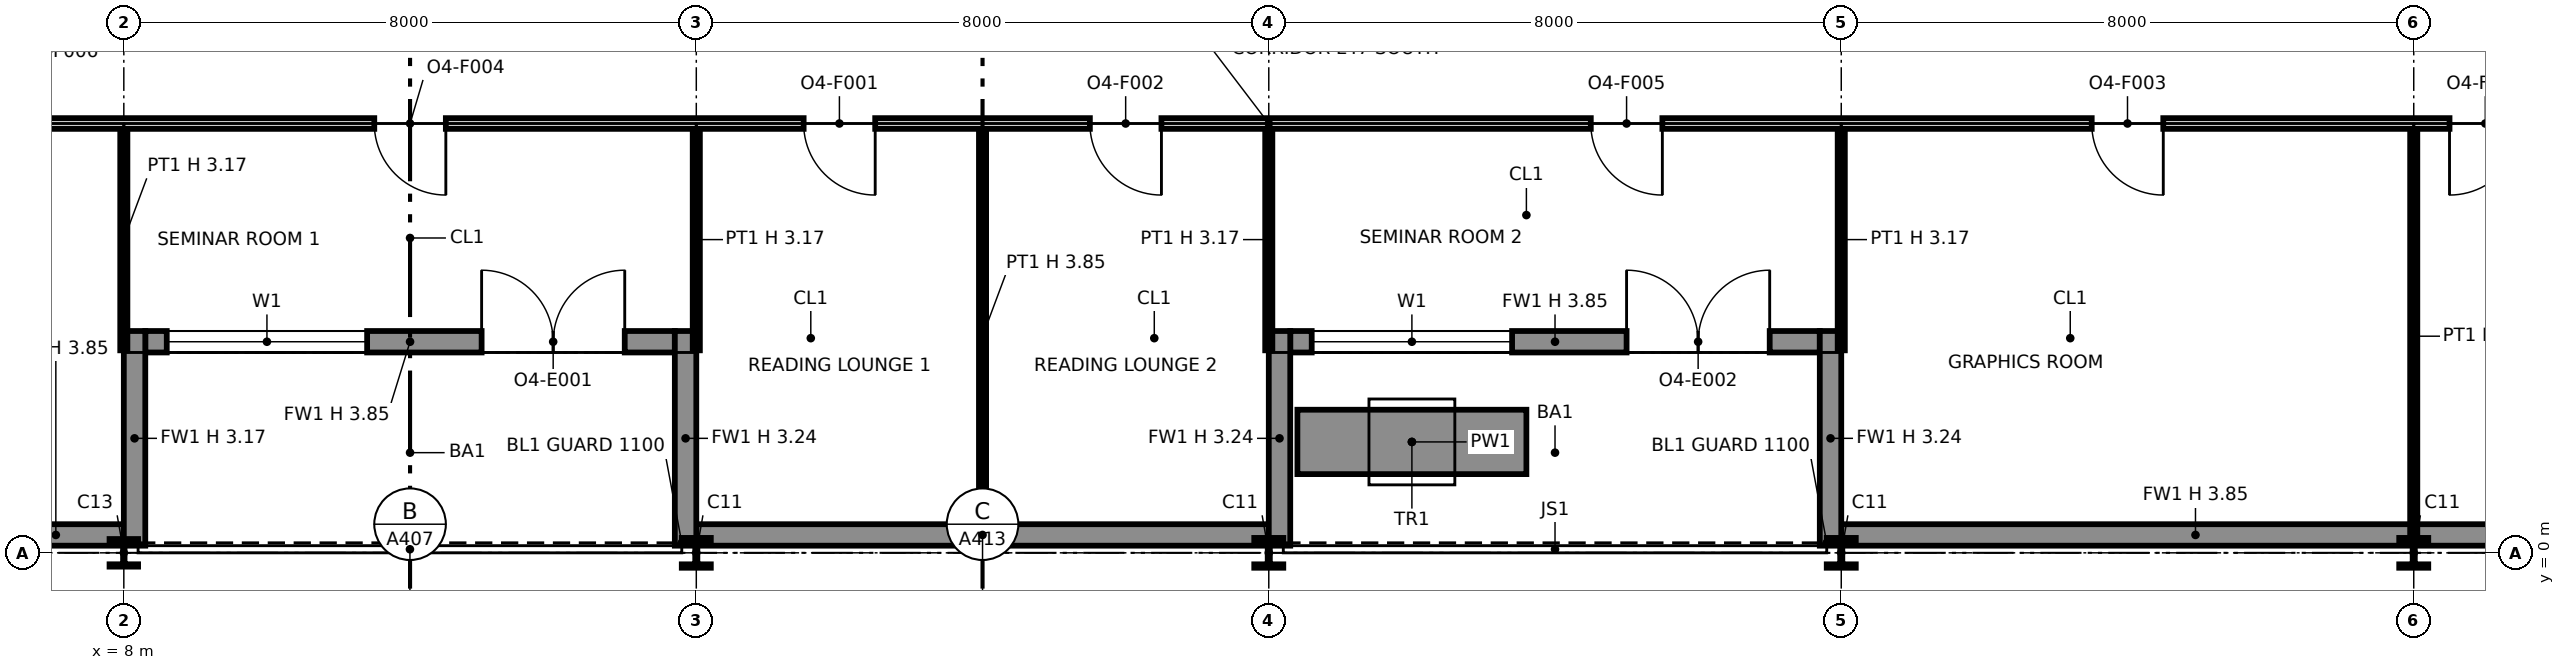
"""IFC4 building model, lengths in metres.
Left out: names, types, materials, properties, quantities, classifications, styles, units other than length and angle.
Written with IfcOpenShell. Run it as: python <this file> out.ifc"""

import sys

from ifc_helpers import new_model, si_unit, direction, frame, frame_2d, origin, origin_2d, place, context, subcontext, project, spatial, polyline, rectangle, i_section, outline, extrude, element, fill, save


model = new_model("IFC4")
c1 = context("Model", 3, precision=1e-05, world=origin(), true_north=direction((0.0, 1.0)))
c2 = subcontext(c1, "Body", "Model", "MODEL_VIEW")
j1 = project(units=[si_unit("LENGTHUNIT", "METRE"), si_unit("PLANEANGLEUNIT", "RADIAN")], contexts=[c1])
p1 = place(None, origin())
s1 = spatial("IfcSite", under=j1, at=p1, CompositionType="ELEMENT")
p2 = place(p1, origin())
s2 = spatial("IfcBuilding", under=s1, at=p2, CompositionType="ELEMENT")
p3 = place(p2, frame((0.0, 0.0, 221.0)))
s3 = spatial("IfcBuildingStorey", under=s2, at=p3, CompositionType="ELEMENT", Elevation=221.0)
p4 = place(p3, frame((8.0, 0.0, 0.0), z_axis=(0.0, 0.0, 1.0), x_axis=(1.0, 0.0, 0.0)))
e1 = element("IfcColumn", 1, at=p4, inside=s3, PredefinedType="COLUMN", context=c2, shape_type="SweptSolid", body=[
    extrude(i_section(OverallWidth=0.399, OverallDepth=0.386, WebThickness=0.021, FlangeThickness=0.033, at=origin_2d()), origin(), (0.0, 0.0, 1.0), 3.85),
])
for number, where, z_axis, x_axis in (
    (2, (16.0, 0.0, 0.0), (0.0, 0.0, 1.0), (1.0, 0.0, 0.0)),
    (3, (24.0, 0.0, 0.0), (0.0, 0.0, 1.0), (1.0, 0.0, 0.0)),
    (4, (32.0, 0.0, 0.0), (0.0, 0.0, 1.0), (1.0, 0.0, 0.0)),
    (5, (40.0, 0.0, 0.0), (0.0, 0.0, 1.0), (1.0, 0.0, 0.0)),
):
    element("IfcColumn", number, at=place(p3, frame(where, z_axis=z_axis, x_axis=x_axis)), inside=s3, PredefinedType="COLUMN", context=c2, shape_type="SweptSolid", body=[
        extrude(i_section(OverallWidth=0.406, OverallDepth=0.417, WebThickness=0.03, FlangeThickness=0.048, at=origin_2d()), origin(), (0.0, 0.0, 1.0), 3.85),
    ])
p5 = place(p3, frame((6.1, 0.25, 0.0), z_axis=(0.0, 0.0, 1.0), x_axis=(1.0, 0.0, 0.0)))
e6 = element("IfcWall", 6, at=p5, inside=s3, PredefinedType="SOLIDWALL", context=c2, shape_type="SweptSolid", body=[
    extrude(rectangle(XDim=1.9, YDim=0.3, at=frame_2d((0.95, 0.0))), origin(), (0.0, 0.0, 1.0), 3.85),
])
p6 = place(p3, frame((8.3, 2.95, 0.0), z_axis=(0.0, 0.0, 1.0), x_axis=(1.0, 0.0, 0.0)))
e7 = element("IfcWall", 7, at=p6, inside=s3, PredefinedType="SOLIDWALL", context=c2, shape_type="SweptSolid", body=[
    extrude(rectangle(XDim=7.4, YDim=0.3, at=frame_2d((3.7, 0.0))), origin(), (0.0, 0.0, 1.0), 3.85),
])
p7 = place(p6, frame((0.3, 0.0, 0.9)))
e8 = element("IfcOpeningElement", 8, at=p7, cuts=e7, PredefinedType="OPENING", context=c2, shape_type="SweptSolid", body=[
    extrude(rectangle(XDim=2.8, YDim=2.2, at=frame_2d((1.4, 1.1))), frame((0.0, 0.16, 0.0), z_axis=(0.0, -1.0, 0.0), x_axis=(1.0, 0.0, 0.0)), (0.0, 0.0, 1.0), 0.32),
])
p8 = place(p6, frame((4.7, 0.0, 0.0)))
e9 = element("IfcOpeningElement", 9, at=p8, cuts=e7, PredefinedType="OPENING", context=c2, shape_type="SweptSolid", body=[
    extrude(rectangle(XDim=2.0, YDim=2.4, at=frame_2d((1.0, 1.2))), frame((0.0, 0.16, 0.0), z_axis=(0.0, -1.0, 0.0), x_axis=(1.0, 0.0, 0.0)), (0.0, 0.0, 1.0), 0.32),
])
p9 = place(p3, frame((8.15, 0.1, 0.0), z_axis=(0.0, 0.0, 1.0), x_axis=(0.0, 1.0, 0.0)))
e10 = element("IfcWall", 10, at=p9, inside=s3, PredefinedType="SOLIDWALL", context=c2, shape_type="SweptSolid", body=[
    extrude(rectangle(XDim=3.0, YDim=0.3, at=frame_2d((1.5, 0.0))), origin(), (0.0, 0.0, 1.0), 3.171),
])
p10 = place(p3, frame((15.85, 0.1, 0.0), z_axis=(0.0, 0.0, 1.0), x_axis=(0.0, 1.0, 0.0)))
e11 = element("IfcWall", 11, at=p10, inside=s3, PredefinedType="SOLIDWALL", context=c2, shape_type="SweptSolid", body=[
    extrude(rectangle(XDim=3.0, YDim=0.3, at=frame_2d((1.5, 0.0))), origin(), (0.0, 0.0, 1.0), 3.237),
])
p11 = place(p3, frame((16.0, 0.25, 0.0), z_axis=(0.0, 0.0, 1.0), x_axis=(1.0, 0.0, 0.0)))
e12 = element("IfcWall", 12, at=p11, inside=s3, PredefinedType="SOLIDWALL", context=c2, shape_type="SweptSolid", body=[
    extrude(rectangle(XDim=8.0, YDim=0.3, at=frame_2d((4.0, 0.0))), origin(), (0.0, 0.0, 1.0), 3.85),
])
p12 = place(p3, frame((24.3, 2.95, 0.0), z_axis=(0.0, 0.0, 1.0), x_axis=(1.0, 0.0, 0.0)))
e13 = element("IfcWall", 13, at=p12, inside=s3, PredefinedType="SOLIDWALL", context=c2, shape_type="SweptSolid", body=[
    extrude(rectangle(XDim=7.4, YDim=0.3, at=frame_2d((3.7, 0.0))), origin(), (0.0, 0.0, 1.0), 3.85),
])
p13 = place(p12, frame((0.3, 0.0, 0.9)))
e14 = element("IfcOpeningElement", 14, at=p13, cuts=e13, PredefinedType="OPENING", context=c2, shape_type="SweptSolid", body=[
    extrude(rectangle(XDim=2.8, YDim=2.2, at=frame_2d((1.4, 1.1))), frame((0.0, 0.16, 0.0), z_axis=(0.0, -1.0, 0.0), x_axis=(1.0, 0.0, 0.0)), (0.0, 0.0, 1.0), 0.32),
])
p14 = place(p12, frame((4.7, 0.0, 0.0)))
e15 = element("IfcOpeningElement", 15, at=p14, cuts=e13, PredefinedType="OPENING", context=c2, shape_type="SweptSolid", body=[
    extrude(rectangle(XDim=2.0, YDim=2.4, at=frame_2d((1.0, 1.2))), frame((0.0, 0.16, 0.0), z_axis=(0.0, -1.0, 0.0), x_axis=(1.0, 0.0, 0.0)), (0.0, 0.0, 1.0), 0.32),
])
for number, where, z_axis, x_axis in (
    (16, (24.15, 0.1, 0.0), (0.0, 0.0, 1.0), (0.0, 1.0, 0.0)),
    (17, (31.85, 0.1, 0.0), (0.0, 0.0, 1.0), (0.0, 1.0, 0.0)),
):
    element("IfcWall", number, at=place(p3, frame(where, z_axis=z_axis, x_axis=x_axis)), inside=s3, PredefinedType="SOLIDWALL", context=c2, shape_type="SweptSolid", body=[
        extrude(rectangle(XDim=3.0, YDim=0.3, at=frame_2d((1.5, 0.0))), origin(), (0.0, 0.0, 1.0), 3.237),
    ])
p15 = place(p3, frame((32.0, 0.25, 0.0), z_axis=(0.0, 0.0, 1.0), x_axis=(1.0, 0.0, 0.0)))
e18 = element("IfcWall", 18, at=p15, inside=s3, PredefinedType="SOLIDWALL", context=c2, shape_type="SweptSolid", body=[
    extrude(rectangle(XDim=9.9, YDim=0.3, at=frame_2d((4.95, 0.0))), origin(), (0.0, 0.0, 1.0), 3.85),
])
p16 = place(p3, frame((24.4, 1.55, 0.0), z_axis=(0.0, 0.0, 1.0), x_axis=(1.0, 0.0, 0.0)))
e19 = element("IfcWall", 19, at=p16, inside=s3, PredefinedType="SOLIDWALL", context=c2, shape_type="SweptSolid", body=[
    extrude(rectangle(XDim=3.2, YDim=0.9, at=frame_2d((1.6, 0.0))), origin(), (0.0, 0.0, 1.0), 0.6),
])
p17 = place(p3, frame((20.0, 0.13, 0.0), z_axis=(0.0, 0.0, 1.0), x_axis=(0.0, 1.0, 0.0)))
e20 = element("IfcWall", 20, at=p17, inside=s3, PredefinedType="PARTITIONING", context=c2, shape_type="SweptSolid", body=[
    extrude(outline(polyline([(0.0, 0.0), (5.795, 0.0), (5.795, 3.85), (4.17, 3.85), (4.168, 3.172), (3.572, 3.172), (3.57, 3.85), (0.0, 3.85), (0.0, 0.0)])), frame((0.0, 0.05, 0.0), z_axis=(0.0, -1.0, 0.0), x_axis=(1.0, 0.0, 0.0)), (0.0, 0.0, 1.0), 0.1),
])
p18 = place(p3, frame((40.0, 0.13, 0.0), z_axis=(0.0, 0.0, 1.0), x_axis=(0.0, 1.0, 0.0)))
e21 = element("IfcWall", 21, at=p18, inside=s3, PredefinedType="PARTITIONING", context=c2, shape_type="SweptSolid", body=[
    extrude(rectangle(XDim=5.795, YDim=0.1, at=frame_2d((2.897, 0.0))), origin(), (0.0, 0.0, 1.0), 3.172),
])
for number, where, z_axis, x_axis in (
    (22, (8.0, 2.83, 0.0), (0.0, 0.0, 1.0), (0.0, 1.0, 0.0)),
    (23, (16.0, 2.83, 0.0), (0.0, 0.0, 1.0), (0.0, 1.0, 0.0)),
    (24, (24.0, 2.83, 0.0), (0.0, 0.0, 1.0), (0.0, 1.0, 0.0)),
    (25, (32.0, 2.83, 0.0), (0.0, 0.0, 1.0), (0.0, 1.0, 0.0)),
):
    element("IfcWall", number, at=place(p3, frame(where, z_axis=z_axis, x_axis=x_axis)), inside=s3, PredefinedType="PARTITIONING", context=c2, shape_type="SweptSolid", body=[
        extrude(rectangle(XDim=3.095, YDim=0.1, at=frame_2d((1.547, 0.0))), origin(), (0.0, 0.0, 1.0), 3.172),
    ])
p19 = place(p3, frame((6.075, 6.0, 0.0), z_axis=(0.0, 0.0, 1.0), x_axis=(1.0, 0.0, 0.0)))
e26 = element("IfcWall", 26, at=p19, inside=s3, PredefinedType="PARTITIONING", context=c2, shape_type="SweptSolid", body=[
    extrude(rectangle(XDim=35.85, YDim=0.15, at=frame_2d((17.925, 0.0))), origin(), (0.0, 0.0, 1.0), 3.85),
])
p20 = place(p19, frame((12.425, 0.0, 0.0), z_axis=(0.0, 0.0, 1.0), x_axis=(-1.0, 0.0, 0.0)))
e27 = element("IfcOpeningElement", 27, at=p20, cuts=e26, PredefinedType="OPENING", context=c2, shape_type="SweptSolid", body=[
    extrude(rectangle(XDim=1.0, YDim=2.1, at=frame_2d((0.5, 1.05))), frame((0.0, 0.085, 0.0), z_axis=(0.0, -1.0, 0.0), x_axis=(1.0, 0.0, 0.0)), (0.0, 0.0, 1.0), 0.17),
])
p21 = place(p19, frame((16.425, 0.0, 0.0), z_axis=(0.0, 0.0, 1.0), x_axis=(-1.0, 0.0, 0.0)))
e28 = element("IfcOpeningElement", 28, at=p21, cuts=e26, PredefinedType="OPENING", context=c2, shape_type="SweptSolid", body=[
    extrude(rectangle(XDim=1.0, YDim=2.1, at=frame_2d((0.5, 1.05))), frame((0.0, 0.085, 0.0), z_axis=(0.0, -1.0, 0.0), x_axis=(1.0, 0.0, 0.0)), (0.0, 0.0, 1.0), 0.17),
])
p22 = place(p19, frame((30.425, 0.0, 0.0), z_axis=(0.0, 0.0, 1.0), x_axis=(-1.0, 0.0, 0.0)))
e29 = element("IfcOpeningElement", 29, at=p22, cuts=e26, PredefinedType="OPENING", context=c2, shape_type="SweptSolid", body=[
    extrude(rectangle(XDim=1.0, YDim=2.1, at=frame_2d((0.5, 1.05))), frame((0.0, 0.085, 0.0), z_axis=(0.0, -1.0, 0.0), x_axis=(1.0, 0.0, 0.0)), (0.0, 0.0, 1.0), 0.17),
])
p23 = place(p19, frame((6.425, 0.0, 0.0), z_axis=(0.0, 0.0, 1.0), x_axis=(-1.0, 0.0, 0.0)))
e30 = element("IfcOpeningElement", 30, at=p23, cuts=e26, PredefinedType="OPENING", context=c2, shape_type="SweptSolid", body=[
    extrude(rectangle(XDim=1.0, YDim=2.1, at=frame_2d((0.5, 1.05))), frame((0.0, 0.085, 0.0), z_axis=(0.0, -1.0, 0.0), x_axis=(1.0, 0.0, 0.0)), (0.0, 0.0, 1.0), 0.17),
])
p24 = place(p19, frame((23.425, 0.0, 0.0), z_axis=(0.0, 0.0, 1.0), x_axis=(-1.0, 0.0, 0.0)))
e31 = element("IfcOpeningElement", 31, at=p24, cuts=e26, PredefinedType="OPENING", context=c2, shape_type="SweptSolid", body=[
    extrude(rectangle(XDim=1.0, YDim=2.1, at=frame_2d((0.5, 1.05))), frame((0.0, 0.085, 0.0), z_axis=(0.0, -1.0, 0.0), x_axis=(1.0, 0.0, 0.0)), (0.0, 0.0, 1.0), 0.17),
])
p25 = place(p19, frame((35.425, 0.0, 0.0), z_axis=(0.0, 0.0, 1.0), x_axis=(-1.0, 0.0, 0.0)))
e32 = element("IfcOpeningElement", 32, at=p25, cuts=e26, PredefinedType="OPENING", context=c2, shape_type="SweptSolid", body=[
    extrude(rectangle(XDim=1.0, YDim=2.1, at=frame_2d((0.5, 1.05))), frame((0.0, 0.085, 0.0), z_axis=(0.0, -1.0, 0.0), x_axis=(1.0, 0.0, 0.0)), (0.0, 0.0, 1.0), 0.17),
])
p26 = place(p7, origin())
e33 = element("IfcWindow", 33, at=p26, inside=s3, PartitioningType="SINGLE_PANEL", PredefinedType="WINDOW", context=c2, shape_type="SweptSolid", body=[
    extrude(rectangle(XDim=2.8, YDim=2.2, at=frame_2d((1.4, 1.1))), frame((0.0, 0.03, 0.0), z_axis=(0.0, -1.0, 0.0), x_axis=(1.0, 0.0, 0.0)), (0.0, 0.0, 1.0), 0.06),
])
fill(e8, e33)
p27 = place(p8, origin())
e34 = element("IfcDoor", 34, at=p27, inside=s3, OperationType="DOUBLE_DOOR_SINGLE_SWING", PredefinedType="DOOR", context=c2, shape_type="SweptSolid", body=[
    extrude(rectangle(XDim=2.0, YDim=2.4, at=frame_2d((1.0, 1.2))), frame((0.0, 0.025, 0.0), z_axis=(0.0, -1.0, 0.0), x_axis=(1.0, 0.0, 0.0)), (0.0, 0.0, 1.0), 0.05),
])
fill(e9, e34)
p28 = place(p13, origin())
e35 = element("IfcWindow", 35, at=p28, inside=s3, PartitioningType="SINGLE_PANEL", PredefinedType="WINDOW", context=c2, shape_type="SweptSolid", body=[
    extrude(rectangle(XDim=2.8, YDim=2.2, at=frame_2d((1.4, 1.1))), frame((0.0, 0.03, 0.0), z_axis=(0.0, -1.0, 0.0), x_axis=(1.0, 0.0, 0.0)), (0.0, 0.0, 1.0), 0.06),
])
fill(e14, e35)
p29 = place(p14, origin())
e36 = element("IfcDoor", 36, at=p29, inside=s3, OperationType="DOUBLE_DOOR_SINGLE_SWING", PredefinedType="DOOR", context=c2, shape_type="SweptSolid", body=[
    extrude(rectangle(XDim=2.0, YDim=2.4, at=frame_2d((1.0, 1.2))), frame((0.0, 0.025, 0.0), z_axis=(0.0, -1.0, 0.0), x_axis=(1.0, 0.0, 0.0)), (0.0, 0.0, 1.0), 0.05),
])
fill(e15, e36)
p30 = place(p20, origin())
e37 = element("IfcDoor", 37, at=p30, inside=s3, OperationType="SINGLE_SWING_LEFT", PredefinedType="DOOR", context=c2, shape_type="SweptSolid", body=[
    extrude(rectangle(XDim=1.0, YDim=2.1, at=frame_2d((0.5, 1.05))), frame((0.0, 0.025, 0.0), z_axis=(0.0, -1.0, 0.0), x_axis=(1.0, 0.0, 0.0)), (0.0, 0.0, 1.0), 0.05),
])
fill(e27, e37)
p31 = place(p21, origin())
e38 = element("IfcDoor", 38, at=p31, inside=s3, OperationType="SINGLE_SWING_LEFT", PredefinedType="DOOR", context=c2, shape_type="SweptSolid", body=[
    extrude(rectangle(XDim=1.0, YDim=2.1, at=frame_2d((0.5, 1.05))), frame((0.0, 0.025, 0.0), z_axis=(0.0, -1.0, 0.0), x_axis=(1.0, 0.0, 0.0)), (0.0, 0.0, 1.0), 0.05),
])
fill(e28, e38)
p32 = place(p22, origin())
e39 = element("IfcDoor", 39, at=p32, inside=s3, OperationType="SINGLE_SWING_LEFT", PredefinedType="DOOR", context=c2, shape_type="SweptSolid", body=[
    extrude(rectangle(XDim=1.0, YDim=2.1, at=frame_2d((0.5, 1.05))), frame((0.0, 0.025, 0.0), z_axis=(0.0, -1.0, 0.0), x_axis=(1.0, 0.0, 0.0)), (0.0, 0.0, 1.0), 0.05),
])
fill(e29, e39)
p33 = place(p23, origin())
e40 = element("IfcDoor", 40, at=p33, inside=s3, OperationType="SINGLE_SWING_LEFT", PredefinedType="DOOR", context=c2, shape_type="SweptSolid", body=[
    extrude(rectangle(XDim=1.0, YDim=2.1, at=frame_2d((0.5, 1.05))), frame((0.0, 0.025, 0.0), z_axis=(0.0, -1.0, 0.0), x_axis=(1.0, 0.0, 0.0)), (0.0, 0.0, 1.0), 0.05),
])
fill(e30, e40)
p34 = place(p24, origin())
e41 = element("IfcDoor", 41, at=p34, inside=s3, OperationType="SINGLE_SWING_LEFT", PredefinedType="DOOR", context=c2, shape_type="SweptSolid", body=[
    extrude(rectangle(XDim=1.0, YDim=2.1, at=frame_2d((0.5, 1.05))), frame((0.0, 0.025, 0.0), z_axis=(0.0, -1.0, 0.0), x_axis=(1.0, 0.0, 0.0)), (0.0, 0.0, 1.0), 0.05),
])
fill(e31, e41)
p35 = place(p25, origin())
e42 = element("IfcDoor", 42, at=p35, inside=s3, OperationType="SINGLE_SWING_RIGHT", PredefinedType="DOOR", context=c2, shape_type="SweptSolid", body=[
    extrude(rectangle(XDim=1.0, YDim=2.1, at=frame_2d((0.5, 1.05))), frame((0.0, 0.025, 0.0), z_axis=(0.0, -1.0, 0.0), x_axis=(1.0, 0.0, 0.0)), (0.0, 0.0, 1.0), 0.05),
])
fill(e32, e42)
save(model, sys.argv[1])
